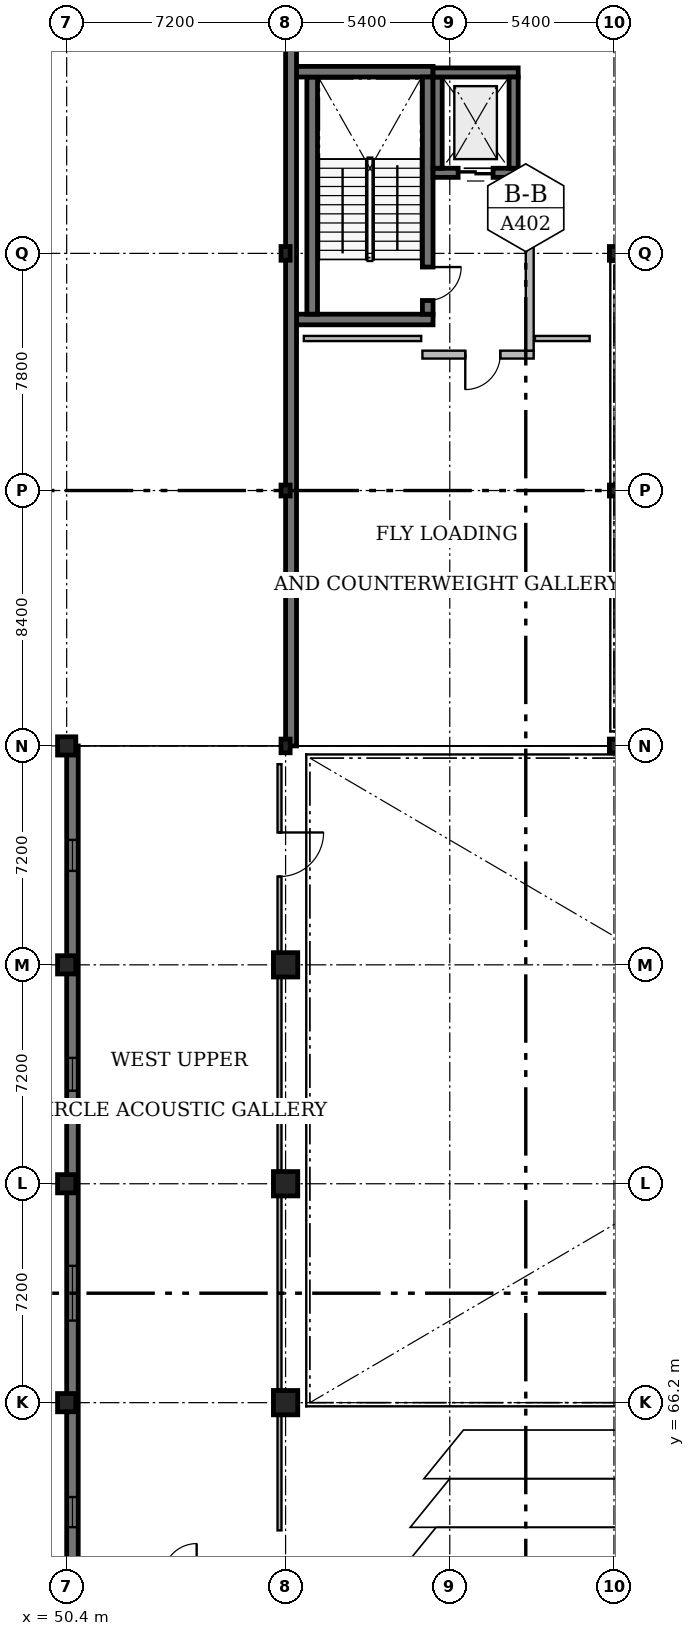
"""IFC4 building model, lengths in metres.
Left out: names, types, materials, properties, quantities, classifications, styles, units other than length and angle.
Written with IfcOpenShell. Run it as: python <this file> out.ifc"""

import sys

from ifc_helpers import new_model, si_unit, direction, frame, frame_2d, origin, origin_2d, place, context, subcontext, project, spatial, rectangle, i_section, extrude, element, fill, save


model = new_model("IFC4")
c1 = context("Model", 3, precision=1e-05, world=origin(), true_north=direction((0.0, 1.0)))
c2 = subcontext(c1, "Body", "Model", "MODEL_VIEW")
j1 = project(units=[si_unit("LENGTHUNIT", "METRE"), si_unit("PLANEANGLEUNIT", "RADIAN")], contexts=[c1])
p1 = place(None, origin())
s1 = spatial("IfcSite", under=j1, at=p1, CompositionType="ELEMENT")
p2 = place(p1, origin())
s2 = spatial("IfcBuilding", under=s1, at=p2, CompositionType="ELEMENT")
p3 = place(p2, frame((0.0, 0.0, 9.0)))
s3 = spatial("IfcBuildingStorey", under=s2, at=p3, CompositionType="ELEMENT", Elevation=9.0)
p4 = place(p3, frame((68.4, 87.8, 0.0), z_axis=(0.0, 0.0, 1.0), x_axis=(1.0, 0.0, 0.0)))
e1 = element("IfcColumn", 1, at=p4, inside=s3, PredefinedType="COLUMN", context=c2, shape_type="SweptSolid", body=[
    extrude(i_section(OverallWidth=0.3, OverallDepth=0.45, WebThickness=0.014, FlangeThickness=0.026, FilletRadius=0.027, at=origin_2d()), origin(), (0.0, 0.0, 1.0), 4.2),
])
p5 = place(p3, frame((68.4, 96.2, 0.0), z_axis=(0.0, 0.0, 1.0), x_axis=(1.0, 0.0, 0.0)))
e2 = element("IfcColumn", 2, at=p5, inside=s3, PredefinedType="COLUMN", context=c2, shape_type="SweptSolid", body=[
    extrude(i_section(OverallWidth=0.3, OverallDepth=0.36, WebThickness=0.012, FlangeThickness=0.022, FilletRadius=0.027, at=origin_2d()), origin(), (0.0, 0.0, 1.0), 4.2),
])
p6 = place(p3, frame((68.4, 104.0, 0.0), z_axis=(0.0, 0.0, 1.0), x_axis=(1.0, 0.0, 0.0)))
e3 = element("IfcColumn", 3, at=p6, inside=s3, PredefinedType="COLUMN", context=c2, shape_type="SweptSolid", body=[
    extrude(i_section(OverallWidth=0.3, OverallDepth=0.45, WebThickness=0.014, FlangeThickness=0.026, FilletRadius=0.027, at=origin_2d()), origin(), (0.0, 0.0, 1.0), 4.2),
])
for number, where, z_axis, x_axis in (
    (4, (50.4, 66.2, 0.0), (0.0, 0.0, 1.0), (1.0, 0.0, 0.0)),
    (5, (50.4, 73.4, 0.0), (0.0, 0.0, 1.0), (1.0, 0.0, 0.0)),
    (6, (50.4, 80.6, 0.0), (0.0, 0.0, 1.0), (1.0, 0.0, 0.0)),
    (7, (50.4, 87.8, 0.0), (0.0, 0.0, 1.0), (1.0, 0.0, 0.0)),
):
    element("IfcColumn", number, at=place(p3, frame(where, z_axis=z_axis, x_axis=x_axis)), inside=s3, PredefinedType="COLUMN", context=c2, shape_type="SweptSolid", body=[
        extrude(rectangle(XDim=0.6, YDim=0.6, at=origin_2d()), origin(), (0.0, 0.0, 1.0), 4.2),
    ])
for number, where, z_axis, x_axis in (
    (8, (57.6, 66.2, 0.0), (0.0, 0.0, 1.0), (1.0, 0.0, 0.0)),
    (9, (57.6, 73.4, 0.0), (0.0, 0.0, 1.0), (1.0, 0.0, 0.0)),
    (10, (57.6, 80.6, 0.0), (0.0, 0.0, 1.0), (1.0, 0.0, 0.0)),
):
    element("IfcColumn", number, at=place(p3, frame(where, z_axis=z_axis, x_axis=x_axis)), inside=s3, PredefinedType="COLUMN", context=c2, shape_type="SweptSolid", body=[
        extrude(rectangle(XDim=0.8, YDim=0.8, at=origin_2d()), origin(), (0.0, 0.0, 1.0), 4.2),
    ])
p7 = place(p3, frame((57.6, 87.8, 0.0), z_axis=(0.0, 0.0, 1.0), x_axis=(1.0, 0.0, 0.0)))
e11 = element("IfcColumn", 11, at=p7, inside=s3, PredefinedType="COLUMN", context=c2, shape_type="SweptSolid", body=[
    extrude(i_section(OverallWidth=0.3, OverallDepth=0.45, WebThickness=0.014, FlangeThickness=0.026, FilletRadius=0.027, at=origin_2d()), origin(), (0.0, 0.0, 1.0), 4.2),
])
p8 = place(p3, frame((57.6, 96.2, 0.0), z_axis=(0.0, 0.0, 1.0), x_axis=(1.0, 0.0, 0.0)))
e12 = element("IfcColumn", 12, at=p8, inside=s3, PredefinedType="COLUMN", context=c2, shape_type="SweptSolid", body=[
    extrude(i_section(OverallWidth=0.3, OverallDepth=0.36, WebThickness=0.012, FlangeThickness=0.022, FilletRadius=0.027, at=origin_2d()), origin(), (0.0, 0.0, 1.0), 4.2),
])
p9 = place(p3, frame((57.6, 104.0, 0.0), z_axis=(0.0, 0.0, 1.0), x_axis=(1.0, 0.0, 0.0)))
e13 = element("IfcColumn", 13, at=p9, inside=s3, PredefinedType="COLUMN", context=c2, shape_type="SweptSolid", body=[
    extrude(i_section(OverallWidth=0.3, OverallDepth=0.45, WebThickness=0.014, FlangeThickness=0.026, FilletRadius=0.027, at=origin_2d()), origin(), (0.0, 0.0, 1.0), 4.2),
])
p10 = place(p3, frame((62.45, 101.825, 0.0), z_axis=(0.0, 0.0, 1.0), x_axis=(-1.0, 0.0, 0.0)))
e14 = element("IfcWall", 14, at=p10, inside=s3, PredefinedType="SOLIDWALL", context=c2, shape_type="SweptSolid", body=[
    extrude(rectangle(XDim=4.49, YDim=0.35, at=frame_2d((2.245, 0.0))), origin(), (0.0, 0.0, 1.0), 4.2),
])
p11 = place(p3, frame((58.475, 102.0, 0.0), z_axis=(0.0, 0.0, 1.0), x_axis=(0.0, 1.0, 0.0)))
e15 = element("IfcWall", 15, at=p11, inside=s3, PredefinedType="SOLIDWALL", context=c2, shape_type="SweptSolid", body=[
    extrude(rectangle(XDim=7.8, YDim=0.35, at=frame_2d((3.9, 0.0))), origin(), (0.0, 0.0, 1.0), 4.2),
])
p12 = place(p3, frame((57.96, 109.975, 0.0), z_axis=(0.0, 0.0, 1.0), x_axis=(1.0, 0.0, 0.0)))
e16 = element("IfcWall", 16, at=p12, inside=s3, PredefinedType="SOLIDWALL", context=c2, shape_type="SweptSolid", body=[
    extrude(rectangle(XDim=4.49, YDim=0.35, at=frame_2d((2.245, 0.0))), origin(), (0.0, 0.0, 1.0), 4.2),
])
p13 = place(p3, frame((62.275, 109.8, 0.0), z_axis=(0.0, 0.0, 1.0), x_axis=(0.0, -1.0, 0.0)))
e17 = element("IfcWall", 17, at=p13, inside=s3, PredefinedType="SOLIDWALL", context=c2, shape_type="SweptSolid", body=[
    extrude(rectangle(XDim=7.8, YDim=0.35, at=frame_2d((3.9, 0.0))), origin(), (0.0, 0.0, 1.0), 4.2),
])
p14 = place(p13, frame((6.25, 0.0, 0.0)))
e18 = element("IfcOpeningElement", 18, at=p14, cuts=e17, PredefinedType="OPENING", context=c2, shape_type="SweptSolid", body=[
    extrude(rectangle(XDim=1.1, YDim=2.15, at=frame_2d((0.55, 1.075))), frame((0.0, 0.195, 0.0), z_axis=(0.0, -1.0, 0.0), x_axis=(1.0, 0.0, 0.0)), (0.0, 0.0, 1.0), 0.39),
])
p15 = place(p3, frame((65.25, 106.65, 0.0), z_axis=(0.0, 0.0, 1.0), x_axis=(-1.0, 0.0, 0.0)))
e19 = element("IfcWall", 19, at=p15, inside=s3, PredefinedType="SOLIDWALL", context=c2, shape_type="SweptSolid", body=[
    extrude(rectangle(XDim=2.8, YDim=0.3, at=frame_2d((1.4, 0.0))), origin(), (0.0, 0.0, 1.0), 4.2),
])
p16 = place(p15, frame((0.825, 0.0, 0.0)))
e20 = element("IfcOpeningElement", 20, at=p16, cuts=e19, PredefinedType="OPENING", context=c2, shape_type="SweptSolid", body=[
    extrude(rectangle(XDim=1.15, YDim=2.1, at=frame_2d((0.575, 1.05))), frame((0.0, 0.17, 0.0), z_axis=(0.0, -1.0, 0.0), x_axis=(1.0, 0.0, 0.0)), (0.0, 0.0, 1.0), 0.34),
])
p17 = place(p3, frame((62.6, 106.8, 0.0), z_axis=(0.0, 0.0, 1.0), x_axis=(0.0, 1.0, 0.0)))
e21 = element("IfcWall", 21, at=p17, inside=s3, PredefinedType="SOLIDWALL", context=c2, shape_type="SweptSolid", body=[
    extrude(rectangle(XDim=3.0, YDim=0.3, at=frame_2d((1.5, 0.0))), origin(), (0.0, 0.0, 1.0), 4.2),
])
p18 = place(p3, frame((62.45, 109.95, 0.0), z_axis=(0.0, 0.0, 1.0), x_axis=(1.0, 0.0, 0.0)))
e22 = element("IfcWall", 22, at=p18, inside=s3, PredefinedType="SOLIDWALL", context=c2, shape_type="SweptSolid", body=[
    extrude(rectangle(XDim=2.8, YDim=0.3, at=frame_2d((1.4, 0.0))), origin(), (0.0, 0.0, 1.0), 4.2),
])
p19 = place(p3, frame((65.1, 109.8, 0.0), z_axis=(0.0, 0.0, 1.0), x_axis=(0.0, -1.0, 0.0)))
e23 = element("IfcWall", 23, at=p19, inside=s3, PredefinedType="SOLIDWALL", context=c2, shape_type="SweptSolid", body=[
    extrude(rectangle(XDim=3.0, YDim=0.3, at=frame_2d((1.5, 0.0))), origin(), (0.0, 0.0, 1.0), 4.2),
])
p20 = place(p3, frame((65.76, 100.67, 0.0), z_axis=(0.0, 0.0, 1.0), x_axis=(-1.0, 0.0, 0.0)))
e24 = element("IfcWall", 24, at=p20, inside=s3, PredefinedType="SOLIDWALL", context=c2, shape_type="SweptSolid", body=[
    extrude(rectangle(XDim=3.66, YDim=0.26, at=frame_2d((1.83, 0.0))), origin(), (0.0, 0.0, 1.0), 3.95),
])
p21 = place(p20, frame((1.1, 0.0, 0.0)))
e25 = element("IfcOpeningElement", 25, at=p21, cuts=e24, PredefinedType="OPENING", context=c2, shape_type="SweptSolid", body=[
    extrude(rectangle(XDim=1.15, YDim=2.2, at=frame_2d((0.575, 1.1))), frame((0.0, 0.15, 0.0), z_axis=(0.0, -1.0, 0.0), x_axis=(1.0, 0.0, 0.0)), (0.0, 0.0, 1.0), 0.3),
])
p22 = place(p3, frame((65.63, 106.65, 0.0), z_axis=(0.0, 0.0, 1.0), x_axis=(0.0, -1.0, 0.0)))
e26 = element("IfcWall", 26, at=p22, inside=s3, PredefinedType="SOLIDWALL", context=c2, shape_type="SweptSolid", body=[
    extrude(rectangle(XDim=5.85, YDim=0.26, at=frame_2d((2.925, 0.0))), origin(), (0.0, 0.0, 1.0), 3.95),
])
p23 = place(p3, frame((50.59, 51.8, 0.0), z_axis=(0.0, 0.0, 1.0), x_axis=(0.0, 1.0, 0.0)))
e27 = element("IfcWall", 27, at=p23, inside=s3, PredefinedType="SOLIDWALL", context=c2, shape_type="SweptSolid", body=[
    extrude(rectangle(XDim=36.0, YDim=0.38, at=frame_2d((18.0, 0.0))), origin(), (0.0, 0.0, 1.0), 3.96),
])
p24 = place(p23, frame((2.835, 0.0, 0.95)))
e28 = element("IfcOpeningElement", 28, at=p24, cuts=e27, PredefinedType="OPENING", context=c2, shape_type="SweptSolid", body=[
    extrude(rectangle(XDim=1.53, YDim=1.75, at=frame_2d((0.765, 0.875))), frame((0.0, 0.21, 0.0), z_axis=(0.0, -1.0, 0.0), x_axis=(1.0, 0.0, 0.0)), (0.0, 0.0, 1.0), 0.42),
])
p25 = place(p23, frame((10.305, 0.0, 0.95)))
e29 = element("IfcOpeningElement", 29, at=p25, cuts=e27, PredefinedType="OPENING", context=c2, shape_type="SweptSolid", body=[
    extrude(rectangle(XDim=0.99, YDim=1.8, at=frame_2d((0.495, 0.9))), frame((0.0, 0.21, 0.0), z_axis=(0.0, -1.0, 0.0), x_axis=(1.0, 0.0, 0.0)), (0.0, 0.0, 1.0), 0.42),
])
p26 = place(p23, frame((17.1, 0.0, 0.95)))
e30 = element("IfcOpeningElement", 30, at=p26, cuts=e27, PredefinedType="OPENING", context=c2, shape_type="SweptSolid", body=[
    extrude(rectangle(XDim=1.8, YDim=1.75, at=frame_2d((0.9, 0.875))), frame((0.0, 0.21, 0.0), z_axis=(0.0, -1.0, 0.0), x_axis=(1.0, 0.0, 0.0)), (0.0, 0.0, 1.0), 0.42),
])
p27 = place(p23, frame((24.66, 0.0, 0.95)))
e31 = element("IfcOpeningElement", 31, at=p27, cuts=e27, PredefinedType="OPENING", context=c2, shape_type="SweptSolid", body=[
    extrude(rectangle(XDim=1.08, YDim=1.6, at=frame_2d((0.54, 0.8))), frame((0.0, 0.21, 0.0), z_axis=(0.0, -1.0, 0.0), x_axis=(1.0, 0.0, 0.0)), (0.0, 0.0, 1.0), 0.42),
])
p28 = place(p23, frame((31.89, 0.0, 0.95)))
e32 = element("IfcOpeningElement", 32, at=p28, cuts=e27, PredefinedType="OPENING", context=c2, shape_type="SweptSolid", body=[
    extrude(rectangle(XDim=1.02, YDim=1.8, at=frame_2d((0.51, 0.9))), frame((0.0, 0.21, 0.0), z_axis=(0.0, -1.0, 0.0), x_axis=(1.0, 0.0, 0.0)), (0.0, 0.0, 1.0), 0.42),
])
p29 = place(p3, frame((57.78, 87.8, 0.0), z_axis=(0.0, 0.0, 1.0), x_axis=(0.0, 1.0, 0.0)))
e33 = element("IfcWall", 33, at=p29, inside=s3, PredefinedType="SOLIDWALL", context=c2, shape_type="SweptSolid", body=[
    extrude(rectangle(XDim=24.0, YDim=0.36, at=frame_2d((12.0, 0.0))), origin(), (0.0, 0.0, 1.0), 3.96),
])
p30 = place(p3, frame((58.2, 101.2, 0.0), z_axis=(0.0, 0.0, 1.0), x_axis=(1.0, 0.0, 0.0)))
e34 = element("IfcWall", 34, at=p30, inside=s3, PredefinedType="PARTITIONING", context=c2, shape_type="SweptSolid", body=[
    extrude(rectangle(XDim=3.86, YDim=0.17, at=frame_2d((1.93, 0.0))), origin(), (0.0, 0.0, 1.0), 3.95),
])
p31 = place(p3, frame((65.8, 101.2, 0.0), z_axis=(0.0, 0.0, 1.0), x_axis=(1.0, 0.0, 0.0)))
e35 = element("IfcWall", 35, at=p31, inside=s3, PredefinedType="PARTITIONING", context=c2, shape_type="SweptSolid", body=[
    extrude(rectangle(XDim=1.8, YDim=0.17, at=frame_2d((0.9, 0.0))), origin(), (0.0, 0.0, 1.0), 3.95),
])
p32 = place(p3, frame((57.4, 87.2, 0.0), z_axis=(0.0, 0.0, 1.0), x_axis=(0.0, -1.0, 0.0)))
e36 = element("IfcWall", 36, at=p32, inside=s3, PredefinedType="PARTITIONING", context=c2, shape_type="SweptSolid", body=[
    extrude(rectangle(XDim=6.18, YDim=0.13, at=frame_2d((3.09, 0.0))), origin(), (0.0, 0.0, 1.0), 3.65),
])
p33 = place(p32, frame((2.247, 0.0, 0.0)))
e37 = element("IfcOpeningElement", 37, at=p33, cuts=e36, PredefinedType="OPENING", context=c2, shape_type="SweptSolid", body=[
    extrude(rectangle(XDim=1.45, YDim=2.2, at=frame_2d((0.725, 1.1))), frame((0.0, 0.085, 0.0), z_axis=(0.0, -1.0, 0.0), x_axis=(1.0, 0.0, 0.0)), (0.0, 0.0, 1.0), 0.17),
])
for number, where, z_axis, x_axis in (
    (38, (57.4, 80.18, 0.0), (0.0, 0.0, 1.0), (0.0, -1.0, 0.0)),
    (39, (57.4, 72.98, 0.0), (0.0, 0.0, 1.0), (0.0, -1.0, 0.0)),
):
    element("IfcWall", number, at=place(p3, frame(where, z_axis=z_axis, x_axis=x_axis)), inside=s3, PredefinedType="PARTITIONING", context=c2, shape_type="SweptSolid", body=[
        extrude(rectangle(XDim=6.36, YDim=0.13, at=frame_2d((3.18, 0.0))), origin(), (0.0, 0.0, 1.0), 3.65),
    ])
p34 = place(p3, frame((57.4, 65.78, 0.0), z_axis=(0.0, 0.0, 1.0), x_axis=(0.0, -1.0, 0.0)))
e40 = element("IfcWall", 40, at=p34, inside=s3, PredefinedType="PARTITIONING", context=c2, shape_type="SweptSolid", body=[
    extrude(rectangle(XDim=3.78, YDim=0.13, at=frame_2d((1.89, 0.0))), origin(), (0.0, 0.0, 1.0), 3.65),
])
p35 = place(p14, origin())
e41 = element("IfcDoor", 41, at=p35, inside=s3, OperationType="SINGLE_SWING_LEFT", PredefinedType="DOOR", context=c2, shape_type="SweptSolid", body=[
    extrude(rectangle(XDim=1.1, YDim=2.15, at=frame_2d((0.55, 1.075))), frame((0.0, 0.025, 0.0), z_axis=(0.0, -1.0, 0.0), x_axis=(1.0, 0.0, 0.0)), (0.0, 0.0, 1.0), 0.05),
])
fill(e18, e41)
p36 = place(p16, origin())
e42 = element("IfcDoor", 42, at=p36, inside=s3, OperationType="DOUBLE_DOOR_SLIDING", PredefinedType="DOOR", context=c2, shape_type="SweptSolid", body=[
    extrude(rectangle(XDim=1.15, YDim=2.1, at=frame_2d((0.575, 1.05))), frame((0.0, 0.025, 0.0), z_axis=(0.0, -1.0, 0.0), x_axis=(1.0, 0.0, 0.0)), (0.0, 0.0, 1.0), 0.05),
])
fill(e20, e42)
p37 = place(p21, origin())
e43 = element("IfcDoor", 43, at=p37, inside=s3, OperationType="SINGLE_SWING_RIGHT", PredefinedType="DOOR", context=c2, shape_type="SweptSolid", body=[
    extrude(rectangle(XDim=1.15, YDim=2.2, at=frame_2d((0.575, 1.1))), frame((0.0, 0.025, 0.0), z_axis=(0.0, -1.0, 0.0), x_axis=(1.0, 0.0, 0.0)), (0.0, 0.0, 1.0), 0.05),
])
fill(e25, e43)
p38 = place(p25, origin())
e44 = element("IfcWindow", 44, at=p38, inside=s3, PartitioningType="SINGLE_PANEL", PredefinedType="WINDOW", context=c2, shape_type="SweptSolid", body=[
    extrude(rectangle(XDim=0.99, YDim=1.8, at=frame_2d((0.495, 0.9))), frame((0.0, 0.03, 0.0), z_axis=(0.0, -1.0, 0.0), x_axis=(1.0, 0.0, 0.0)), (0.0, 0.0, 1.0), 0.06),
])
fill(e29, e44)
p39 = place(p26, origin())
e45 = element("IfcWindow", 45, at=p39, inside=s3, PartitioningType="SINGLE_PANEL", PredefinedType="WINDOW", context=c2, shape_type="SweptSolid", body=[
    extrude(rectangle(XDim=1.8, YDim=1.75, at=frame_2d((0.9, 0.875))), frame((0.0, 0.03, 0.0), z_axis=(0.0, -1.0, 0.0), x_axis=(1.0, 0.0, 0.0)), (0.0, 0.0, 1.0), 0.06),
])
fill(e30, e45)
p40 = place(p27, origin())
e46 = element("IfcWindow", 46, at=p40, inside=s3, PartitioningType="SINGLE_PANEL", PredefinedType="WINDOW", context=c2, shape_type="SweptSolid", body=[
    extrude(rectangle(XDim=1.08, YDim=1.6, at=frame_2d((0.54, 0.8))), frame((0.0, 0.03, 0.0), z_axis=(0.0, -1.0, 0.0), x_axis=(1.0, 0.0, 0.0)), (0.0, 0.0, 1.0), 0.06),
])
fill(e31, e46)
p41 = place(p28, origin())
e47 = element("IfcWindow", 47, at=p41, inside=s3, PartitioningType="SINGLE_PANEL", PredefinedType="WINDOW", context=c2, shape_type="SweptSolid", body=[
    extrude(rectangle(XDim=1.02, YDim=1.8, at=frame_2d((0.51, 0.9))), frame((0.0, 0.03, 0.0), z_axis=(0.0, -1.0, 0.0), x_axis=(1.0, 0.0, 0.0)), (0.0, 0.0, 1.0), 0.06),
])
fill(e32, e47)
p42 = place(p33, origin())
e48 = element("IfcDoor", 48, at=p42, inside=s3, OperationType="DOUBLE_DOOR_SINGLE_SWING", PredefinedType="DOOR", context=c2, shape_type="SweptSolid", body=[
    extrude(rectangle(XDim=1.45, YDim=2.2, at=frame_2d((0.725, 1.1))), frame((0.0, 0.025, 0.0), z_axis=(0.0, -1.0, 0.0), x_axis=(1.0, 0.0, 0.0)), (0.0, 0.0, 1.0), 0.05),
])
fill(e37, e48)
save(model, sys.argv[1])
